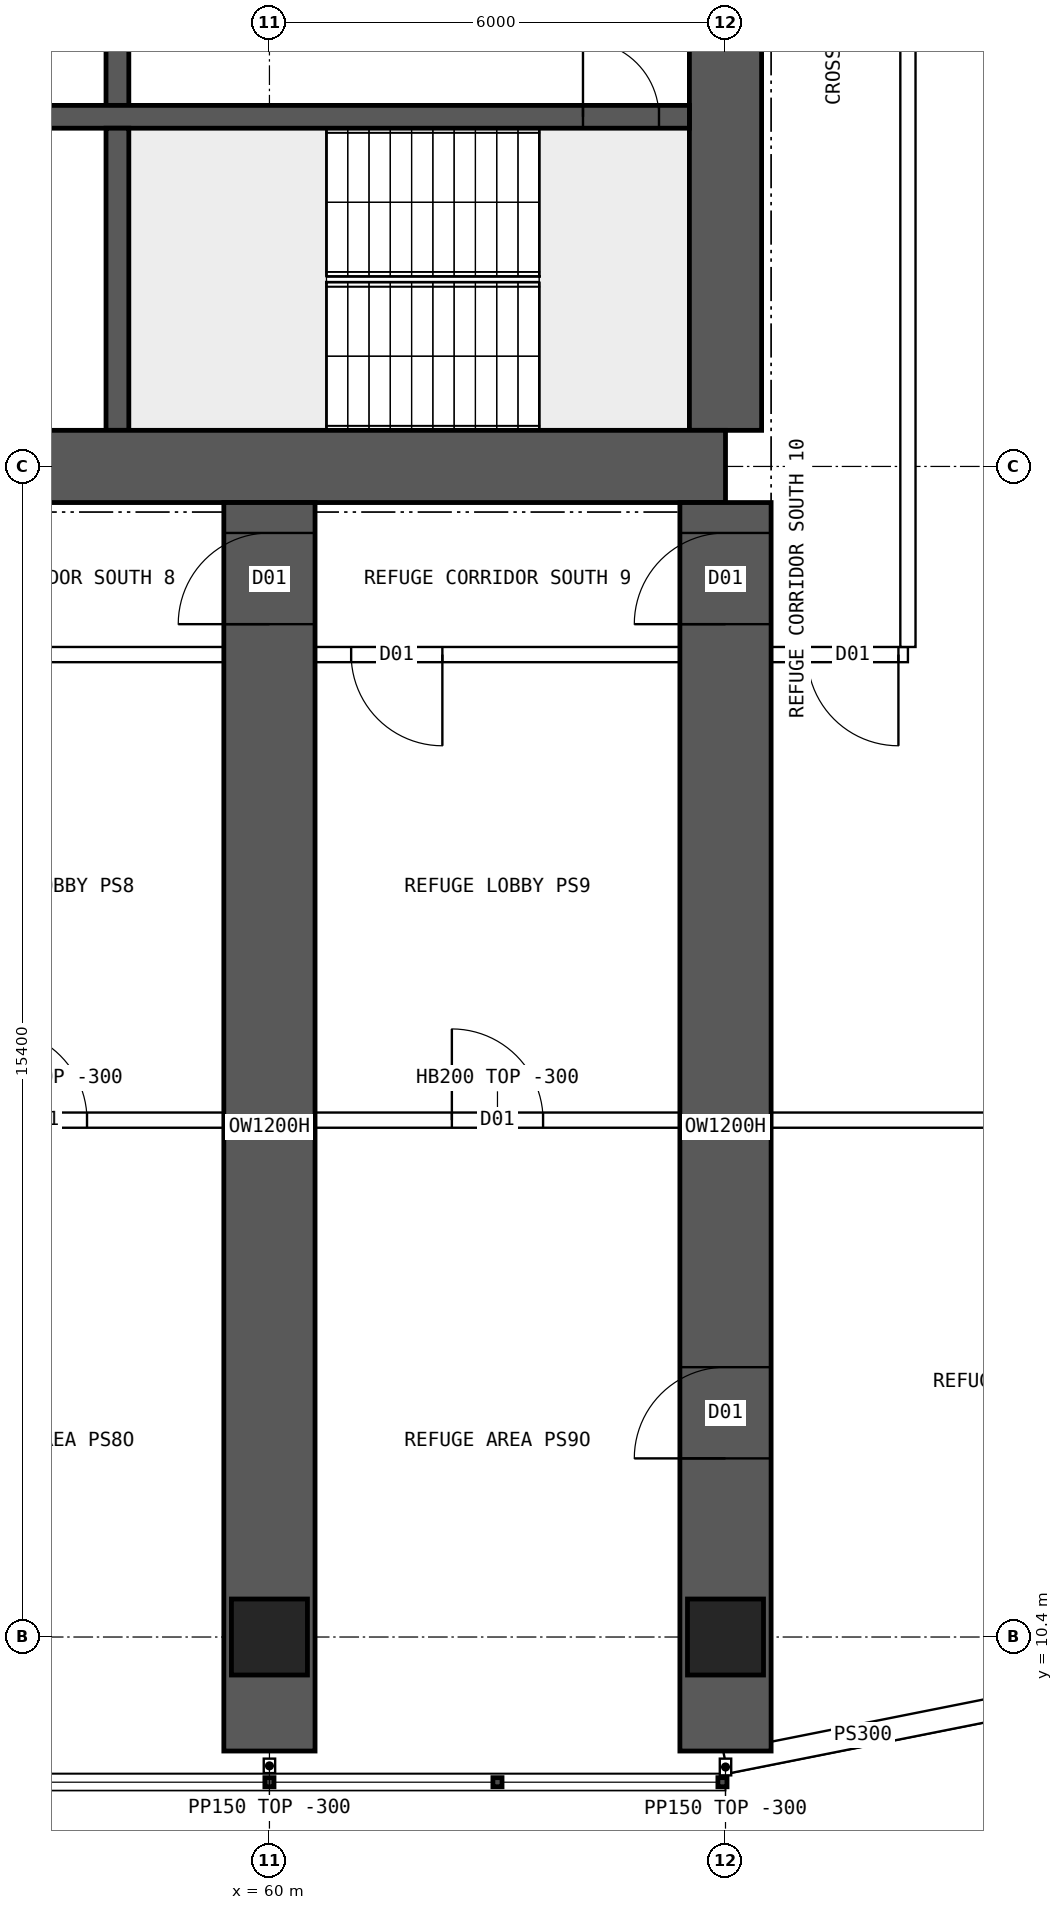
"""IFC4 building model, lengths in metres.
Left out: names, types, materials, properties, quantities, classifications, styles, units other than length and angle.
Written with IfcOpenShell. Run it as: python <this file> out.ifc"""

import sys

from ifc_helpers import new_model, si_unit, direction, frame, frame_2d, origin, origin_2d, place, context, subcontext, project, spatial, polyline, rectangle, hollow_rectangle, outline, extrude, clip, halfspace, element, fill, save


model = new_model("IFC4")
c1 = context("Model", 3, precision=1e-05, world=origin(), true_north=direction((0.0, 1.0)))
c2 = subcontext(c1, "Body", "Model", "MODEL_VIEW")
j1 = project(units=[si_unit("LENGTHUNIT", "METRE"), si_unit("PLANEANGLEUNIT", "RADIAN")], contexts=[c1])
p1 = place(None, origin())
s1 = spatial("IfcSite", under=j1, at=p1, CompositionType="ELEMENT")
p2 = place(p1, origin())
s2 = spatial("IfcBuilding", under=s1, at=p2, CompositionType="ELEMENT")
p3 = place(p2, frame((0.0, 0.0, 133.15)))
s3 = spatial("IfcBuildingStorey", under=s2, at=p3, CompositionType="ELEMENT", Elevation=133.15)
for number, where, z_axis, x_axis in (
    (1, (60.0, 10.4, 0.0), (0.0, 0.0, 1.0), (1.0, 0.0, 0.0)),
    (2, (66.0, 10.4, 0.0), (0.0, 0.0, 1.0), (1.0, 0.0, 0.0)),
):
    element("IfcColumn", number, at=place(p3, frame(where, z_axis=z_axis, x_axis=x_axis)), inside=s3, PredefinedType="COLUMN", context=c2, shape_type="SweptSolid", body=[
        extrude(hollow_rectangle(XDim=1.0, YDim=1.0, WallThickness=0.1, at=origin_2d()), origin(), (0.0, 0.0, 1.0), 7.2),
    ])
p4 = place(p3, frame((18.0, 25.8, 0.0), z_axis=(0.0, 0.0, 1.0), x_axis=(1.0, 0.0, 0.0)))
e3 = element("IfcWall", 3, at=p4, inside=s3, PredefinedType="SHEAR", context=c2, shape_type="SweptSolid", body=[
    extrude(rectangle(XDim=48.0, YDim=0.95, at=frame_2d((24.0, 0.0))), origin(), (0.0, 0.0, 1.0), 7.2),
])
p5 = place(p3, frame((66.0, 26.275, 0.0), z_axis=(0.0, 0.0, 1.0), x_axis=(0.0, 1.0, 0.0)))
e4 = element("IfcWall", 4, at=p5, inside=s3, PredefinedType="SHEAR", context=c2, shape_type="SweptSolid", body=[
    extrude(rectangle(XDim=11.45, YDim=0.95, at=frame_2d((5.725, 0.0))), origin(), (0.0, 0.0, 1.0), 7.2),
])
p6 = place(p5, frame((5.025, 0.0, 0.0)))
e5 = element("IfcOpeningElement", 5, at=p6, cuts=e4, PredefinedType="OPENING", context=c2, shape_type="SweptSolid", body=[
    extrude(rectangle(XDim=1.2, YDim=2.1, at=frame_2d((0.6, 1.05))), frame((0.0, 0.485, 0.0), z_axis=(0.0, -1.0, 0.0), x_axis=(1.0, 0.0, 0.0)), (0.0, 0.0, 1.0), 0.97),
])
p7 = place(p3, frame((18.475, 30.4, 0.0), z_axis=(0.0, 0.0, 1.0), x_axis=(1.0, 0.0, 0.0)))
e6 = element("IfcWall", 6, at=p7, inside=s3, PredefinedType="SHEAR", context=c2, shape_type="SweptSolid", body=[
    extrude(rectangle(XDim=47.05, YDim=0.3, at=frame_2d((23.525, 0.0))), origin(), (0.0, 0.0, 1.0), 7.2),
])
p8 = place(p7, frame((0.4, 0.0, 0.0)))
e7 = element("IfcOpeningElement", 7, at=p8, cuts=e6, PredefinedType="OPENING", context=c2, shape_type="SweptSolid", body=[
    extrude(rectangle(XDim=1.0, YDim=2.1, at=frame_2d((0.5, 1.05))), frame((0.0, 0.16, 0.0), z_axis=(0.0, -1.0, 0.0), x_axis=(1.0, 0.0, 0.0)), (0.0, 0.0, 1.0), 0.32),
])
p9 = place(p7, frame((45.65, 0.0, 0.0)))
e8 = element("IfcOpeningElement", 8, at=p9, cuts=e6, PredefinedType="OPENING", context=c2, shape_type="SweptSolid", body=[
    extrude(rectangle(XDim=1.0, YDim=2.1, at=frame_2d((0.5, 1.05))), frame((0.0, 0.16, 0.0), z_axis=(0.0, -1.0, 0.0), x_axis=(1.0, 0.0, 0.0)), (0.0, 0.0, 1.0), 0.32),
])
p10 = place(p7, frame((18.85, 0.0, 0.0)))
e9 = element("IfcOpeningElement", 9, at=p10, cuts=e6, PredefinedType="OPENING", context=c2, shape_type="SweptSolid", body=[
    extrude(rectangle(XDim=0.9, YDim=2.1, at=frame_2d((0.45, 1.05))), frame((0.0, 0.16, 0.0), z_axis=(0.0, -1.0, 0.0), x_axis=(1.0, 0.0, 0.0)), (0.0, 0.0, 1.0), 0.32),
])
p11 = place(p7, frame((30.142, 0.0, 0.0)))
e10 = element("IfcOpeningElement", 10, at=p11, cuts=e6, PredefinedType="OPENING", context=c2, shape_type="SweptSolid", body=[
    extrude(rectangle(XDim=1.1, YDim=2.1, at=frame_2d((0.55, 1.05))), frame((0.0, 0.16, 0.0), z_axis=(0.0, -1.0, 0.0), x_axis=(1.0, 0.0, 0.0)), (0.0, 0.0, 1.0), 0.32),
])
p12 = place(p7, frame((33.675, 0.0, 0.0)))
e11 = element("IfcOpeningElement", 11, at=p12, cuts=e6, PredefinedType="OPENING", context=c2, shape_type="SweptSolid", body=[
    extrude(rectangle(XDim=1.1, YDim=2.1, at=frame_2d((0.55, 1.05))), frame((0.0, 0.16, 0.0), z_axis=(0.0, -1.0, 0.0), x_axis=(1.0, 0.0, 0.0)), (0.0, 0.0, 1.0), 0.32),
])
p13 = place(p7, frame((37.208, 0.0, 0.0)))
e12 = element("IfcOpeningElement", 12, at=p13, cuts=e6, PredefinedType="OPENING", context=c2, shape_type="SweptSolid", body=[
    extrude(rectangle(XDim=1.1, YDim=2.1, at=frame_2d((0.55, 1.05))), frame((0.0, 0.16, 0.0), z_axis=(0.0, -1.0, 0.0), x_axis=(1.0, 0.0, 0.0)), (0.0, 0.0, 1.0), 0.32),
])
p14 = place(p3, frame((58.0, 26.275, 0.0), z_axis=(0.0, 0.0, 1.0), x_axis=(0.0, 1.0, 0.0)))
e13 = element("IfcWall", 13, at=p14, inside=s3, PredefinedType="SHEAR", context=c2, shape_type="SweptSolid", body=[
    extrude(rectangle(XDim=3.975, YDim=0.3, at=frame_2d((1.988, 0.0))), origin(), (0.0, 0.0, 1.0), 7.2),
])
p15 = place(p3, frame((58.0, 30.55, 0.0), z_axis=(0.0, 0.0, 1.0), x_axis=(0.0, 1.0, 0.0)))
e14 = element("IfcWall", 14, at=p15, inside=s3, PredefinedType="SHEAR", context=c2, shape_type="SweptSolid", body=[
    extrude(rectangle(XDim=3.9, YDim=0.3, at=frame_2d((1.95, 0.0))), origin(), (0.0, 0.0, 1.0), 7.2),
])
p16 = place(p15, frame((1.4, 0.0, 0.0)))
e15 = element("IfcOpeningElement", 15, at=p16, cuts=e14, PredefinedType="OPENING", context=c2, shape_type="SweptSolid", body=[
    extrude(rectangle(XDim=1.2, YDim=2.1, at=frame_2d((0.6, 1.05))), frame((0.0, 0.16, 0.0), z_axis=(0.0, -1.0, 0.0), x_axis=(1.0, 0.0, 0.0)), (0.0, 0.0, 1.0), 0.32),
])
p17 = place(p3, frame((60.0, 8.9, 0.0), z_axis=(0.0, 0.0, 1.0), x_axis=(0.0, 1.0, 0.0)))
e16 = element("IfcWall", 16, at=p17, inside=s3, PredefinedType="SHEAR", context=c2, shape_type="SweptSolid", body=[
    extrude(rectangle(XDim=16.425, YDim=1.2, at=frame_2d((8.212, 0.0))), origin(), (0.0, 0.0, 1.0), 7.2),
])
p18 = place(p17, frame((14.825, 0.0, 0.0)))
e17 = element("IfcOpeningElement", 17, at=p18, cuts=e16, PredefinedType="OPENING", context=c2, shape_type="SweptSolid", body=[
    extrude(rectangle(XDim=1.2, YDim=2.1, at=frame_2d((0.6, 1.05))), frame((0.0, 0.61, 0.0), z_axis=(0.0, -1.0, 0.0), x_axis=(1.0, 0.0, 0.0)), (0.0, 0.0, 1.0), 1.22),
])
p19 = place(p3, frame((66.0, 8.9, 0.0), z_axis=(0.0, 0.0, 1.0), x_axis=(0.0, 1.0, 0.0)))
e18 = element("IfcWall", 18, at=p19, inside=s3, PredefinedType="SHEAR", context=c2, shape_type="SweptSolid", body=[
    extrude(rectangle(XDim=16.425, YDim=1.2, at=frame_2d((8.212, 0.0))), origin(), (0.0, 0.0, 1.0), 7.2),
])
p20 = place(p19, frame((14.825, 0.0, 0.0)))
e19 = element("IfcOpeningElement", 19, at=p20, cuts=e18, PredefinedType="OPENING", context=c2, shape_type="SweptSolid", body=[
    extrude(rectangle(XDim=1.2, YDim=2.1, at=frame_2d((0.6, 1.05))), frame((0.0, 0.61, 0.0), z_axis=(0.0, -1.0, 0.0), x_axis=(1.0, 0.0, 0.0)), (0.0, 0.0, 1.0), 1.22),
])
p21 = place(p19, frame((3.85, 0.0, 0.0)))
e20 = element("IfcOpeningElement", 20, at=p21, cuts=e18, PredefinedType="OPENING", context=c2, shape_type="SweptSolid", body=[
    extrude(rectangle(XDim=1.2, YDim=2.1, at=frame_2d((0.6, 1.05))), frame((0.0, 0.61, 0.0), z_axis=(0.0, -1.0, 0.0), x_axis=(1.0, 0.0, 0.0)), (0.0, 0.0, 1.0), 1.22),
])
p22 = place(p3, frame((66.0, 8.75, 0.0), z_axis=(0.0, 0.0, 1.0), x_axis=(0.980791473772, 0.195059183267, 0.0)))
e21 = element("IfcWall", 21, at=p22, inside=s3, PredefinedType="SOLIDWALL", context=c2, shape_type="SweptSolid", body=[
    extrude(outline(polyline([(-0.03, -0.15), (3.717, -0.15), (3.657, 0.15), (0.03, 0.15), (-0.03, -0.15)])), origin(), (0.0, 0.0, 1.0), 6.9),
])
p23 = place(p3, frame((68.4, 23.325, 0.0), z_axis=(0.0, 0.0, 1.0), x_axis=(-1.0, 0.0, 0.0)))
e22 = element("IfcWall", 22, at=p23, inside=s3, PredefinedType="SOLIDWALL", context=c2, shape_type="SweptSolid", body=[
    extrude(rectangle(XDim=52.8, YDim=0.2, at=frame_2d((26.4, 0.0))), origin(), (0.0, 0.0, 1.0), 6.9),
])
p24 = place(p23, frame((51.0, 0.0, 0.0)))
e23 = element("IfcOpeningElement", 23, at=p24, cuts=e22, PredefinedType="OPENING", context=c2, shape_type="SweptSolid", body=[
    extrude(rectangle(XDim=1.2, YDim=2.1, at=frame_2d((0.6, 1.05))), frame((0.0, 0.11, 0.0), z_axis=(0.0, -1.0, 0.0), x_axis=(1.0, 0.0, 0.0)), (0.0, 0.0, 1.0), 0.22),
])
p25 = place(p23, frame((48.125, 0.0, 0.0)))
e24 = element("IfcOpeningElement", 24, at=p25, cuts=e22, PredefinedType="OPENING", context=c2, shape_type="SweptSolid", body=[
    extrude(rectangle(XDim=1.2, YDim=2.1, at=frame_2d((0.6, 1.05))), frame((0.0, 0.11, 0.0), z_axis=(0.0, -1.0, 0.0), x_axis=(1.0, 0.0, 0.0)), (0.0, 0.0, 1.0), 0.22),
])
p26 = place(p23, frame((42.125, 0.0, 0.0)))
e25 = element("IfcOpeningElement", 25, at=p26, cuts=e22, PredefinedType="OPENING", context=c2, shape_type="SweptSolid", body=[
    extrude(rectangle(XDim=1.2, YDim=2.1, at=frame_2d((0.6, 1.05))), frame((0.0, 0.11, 0.0), z_axis=(0.0, -1.0, 0.0), x_axis=(1.0, 0.0, 0.0)), (0.0, 0.0, 1.0), 0.22),
])
p27 = place(p23, frame((36.125, 0.0, 0.0)))
e26 = element("IfcOpeningElement", 26, at=p27, cuts=e22, PredefinedType="OPENING", context=c2, shape_type="SweptSolid", body=[
    extrude(rectangle(XDim=1.2, YDim=2.1, at=frame_2d((0.6, 1.05))), frame((0.0, 0.11, 0.0), z_axis=(0.0, -1.0, 0.0), x_axis=(1.0, 0.0, 0.0)), (0.0, 0.0, 1.0), 0.22),
])
p28 = place(p23, frame((30.125, 0.0, 0.0)))
e27 = element("IfcOpeningElement", 27, at=p28, cuts=e22, PredefinedType="OPENING", context=c2, shape_type="SweptSolid", body=[
    extrude(rectangle(XDim=1.2, YDim=2.1, at=frame_2d((0.6, 1.05))), frame((0.0, 0.11, 0.0), z_axis=(0.0, -1.0, 0.0), x_axis=(1.0, 0.0, 0.0)), (0.0, 0.0, 1.0), 0.22),
])
p29 = place(p23, frame((24.125, 0.0, 0.0)))
e28 = element("IfcOpeningElement", 28, at=p29, cuts=e22, PredefinedType="OPENING", context=c2, shape_type="SweptSolid", body=[
    extrude(rectangle(XDim=1.2, YDim=2.1, at=frame_2d((0.6, 1.05))), frame((0.0, 0.11, 0.0), z_axis=(0.0, -1.0, 0.0), x_axis=(1.0, 0.0, 0.0)), (0.0, 0.0, 1.0), 0.22),
])
p30 = place(p23, frame((18.125, 0.0, 0.0)))
e29 = element("IfcOpeningElement", 29, at=p30, cuts=e22, PredefinedType="OPENING", context=c2, shape_type="SweptSolid", body=[
    extrude(rectangle(XDim=1.2, YDim=2.1, at=frame_2d((0.6, 1.05))), frame((0.0, 0.11, 0.0), z_axis=(0.0, -1.0, 0.0), x_axis=(1.0, 0.0, 0.0)), (0.0, 0.0, 1.0), 0.22),
])
p31 = place(p23, frame((12.125, 0.0, 0.0)))
e30 = element("IfcOpeningElement", 30, at=p31, cuts=e22, PredefinedType="OPENING", context=c2, shape_type="SweptSolid", body=[
    extrude(rectangle(XDim=1.2, YDim=2.1, at=frame_2d((0.6, 1.05))), frame((0.0, 0.11, 0.0), z_axis=(0.0, -1.0, 0.0), x_axis=(1.0, 0.0, 0.0)), (0.0, 0.0, 1.0), 0.22),
])
p32 = place(p23, frame((6.125, 0.0, 0.0)))
e31 = element("IfcOpeningElement", 31, at=p32, cuts=e22, PredefinedType="OPENING", context=c2, shape_type="SweptSolid", body=[
    extrude(rectangle(XDim=1.2, YDim=2.1, at=frame_2d((0.6, 1.05))), frame((0.0, 0.11, 0.0), z_axis=(0.0, -1.0, 0.0), x_axis=(1.0, 0.0, 0.0)), (0.0, 0.0, 1.0), 0.22),
])
p33 = place(p23, frame((0.125, 0.0, 0.0)))
e32 = element("IfcOpeningElement", 32, at=p33, cuts=e22, PredefinedType="OPENING", context=c2, shape_type="SweptSolid", body=[
    extrude(rectangle(XDim=1.2, YDim=2.1, at=frame_2d((0.6, 1.05))), frame((0.0, 0.11, 0.0), z_axis=(0.0, -1.0, 0.0), x_axis=(1.0, 0.0, 0.0)), (0.0, 0.0, 1.0), 0.22),
])
p34 = place(p3, frame((68.4, 23.425, 0.0), z_axis=(0.0, 0.0, 1.0), x_axis=(0.0, 1.0, 0.0)))
e33 = element("IfcWall", 33, at=p34, inside=s3, PredefinedType="SOLIDWALL", context=c2, shape_type="SweptSolid", body=[
    extrude(rectangle(XDim=17.15, YDim=0.2, at=frame_2d((8.575, 0.0))), origin(), (0.0, 0.0, 1.0), 6.9),
])
p35 = place(p3, frame((54.475, 17.2, 0.0), z_axis=(0.0, 0.0, 1.0), x_axis=(1.0, 0.0, 0.0)))
e34 = element("IfcWall", 34, at=p35, inside=s3, PredefinedType="SOLIDWALL", context=c2, shape_type="SweptSolid", body=[
    extrude(rectangle(XDim=5.05, YDim=0.2, at=frame_2d((2.525, 0.0))), origin(), (0.0, 0.0, 1.0), 6.9),
])
p36 = place(p35, frame((1.925, 0.0, 0.0)))
e35 = element("IfcOpeningElement", 35, at=p36, cuts=e34, PredefinedType="OPENING", context=c2, shape_type="SweptSolid", body=[
    extrude(rectangle(XDim=1.2, YDim=2.1, at=frame_2d((0.6, 1.05))), frame((0.0, 0.11, 0.0), z_axis=(0.0, -1.0, 0.0), x_axis=(1.0, 0.0, 0.0)), (0.0, 0.0, 1.0), 0.22),
])
p37 = place(p3, frame((60.475, 17.2, 0.0), z_axis=(0.0, 0.0, 1.0), x_axis=(1.0, 0.0, 0.0)))
e36 = element("IfcWall", 36, at=p37, inside=s3, PredefinedType="SOLIDWALL", context=c2, shape_type="SweptSolid", body=[
    extrude(rectangle(XDim=5.05, YDim=0.2, at=frame_2d((2.525, 0.0))), origin(), (0.0, 0.0, 1.0), 6.9),
])
p38 = place(p37, frame((1.925, 0.0, 0.0)))
e37 = element("IfcOpeningElement", 37, at=p38, cuts=e36, PredefinedType="OPENING", context=c2, shape_type="SweptSolid", body=[
    extrude(rectangle(XDim=1.2, YDim=2.1, at=frame_2d((0.6, 1.05))), frame((0.0, 0.11, 0.0), z_axis=(0.0, -1.0, 0.0), x_axis=(1.0, 0.0, 0.0)), (0.0, 0.0, 1.0), 0.22),
])
p39 = place(p3, frame((66.475, 17.2, 0.0), z_axis=(0.0, 0.0, 1.0), x_axis=(1.0, 0.0, 0.0)))
e38 = element("IfcWall", 38, at=p39, inside=s3, PredefinedType="SOLIDWALL", context=c2, shape_type="Clipping", body=[
    clip(clip(extrude(outline(polyline([(-0.03, 0.0), (8.648, 0.0), (8.648, 6.9), (5.827, 6.9), (5.825, 6.45), (5.227, 6.45), (5.225, 6.9), (-0.03, 6.9), (-0.03, 0.0)])), frame((0.0, 0.1, 0.0), z_axis=(0.0, -1.0, 0.0), x_axis=(1.0, 0.0, 0.0)), (0.0, 0.0, 1.0), 0.2), halfspace(frame((0.0, 0.0, 0.0), z_axis=(-1.0, 0.0, 0.0)), False)), halfspace(frame((8.618, 0.0, 0.0), z_axis=(0.98078778892, -0.195077710428, 0.0)), False)),
])
p40 = place(p39, frame((3.708, 0.0, 0.0)))
e39 = element("IfcOpeningElement", 39, at=p40, cuts=e38, PredefinedType="OPENING", context=c2, shape_type="SweptSolid", body=[
    extrude(rectangle(XDim=1.2, YDim=2.1, at=frame_2d((0.6, 1.05))), frame((0.0, 0.11, 0.0), z_axis=(0.0, -1.0, 0.0), x_axis=(1.0, 0.0, 0.0)), (0.0, 0.0, 1.0), 0.22),
])
p41 = place(p3, frame((60.0, 8.8, 0.0), z_axis=(0.0, 0.0, 1.0), x_axis=(0.0, -1.0, 0.0)))
e40 = element("IfcWall", 40, at=p41, inside=s3, PredefinedType="PARTITIONING", context=c2, shape_type="SweptSolid", body=[
    extrude(rectangle(XDim=0.19, YDim=0.15, at=frame_2d((0.095, 0.0))), origin(), (0.0, 0.0, 1.0), 6.9),
])
p42 = place(p3, frame((66.0, 8.8, 0.0), z_axis=(0.0, 0.0, 1.0), x_axis=(0.0, -1.0, 0.0)))
e41 = element("IfcWall", 41, at=p42, inside=s3, PredefinedType="PARTITIONING", context=c2, shape_type="SweptSolid", body=[
    extrude(rectangle(XDim=0.22, YDim=0.15, at=frame_2d((0.11, 0.0))), origin(), (0.0, 0.0, 1.0), 6.9),
])
p43 = place(p9, origin())
e42 = element("IfcDoor", 42, at=p43, inside=s3, OperationType="SINGLE_SWING_LEFT", PredefinedType="DOOR", context=c2, shape_type="SweptSolid", body=[
    extrude(rectangle(XDim=1.0, YDim=2.1, at=frame_2d((0.5, 1.05))), frame((0.0, 0.025, 0.0), z_axis=(0.0, -1.0, 0.0), x_axis=(1.0, 0.0, 0.0)), (0.0, 0.0, 1.0), 0.05),
])
fill(e8, e42)
p44 = place(p36, origin())
e43 = element("IfcDoor", 43, at=p44, inside=s3, OperationType="SINGLE_SWING_LEFT", PredefinedType="DOOR", context=c2, shape_type="SweptSolid", body=[
    extrude(rectangle(XDim=1.2, YDim=2.1, at=frame_2d((0.6, 1.05))), frame((0.0, 0.025, 0.0), z_axis=(0.0, -1.0, 0.0), x_axis=(1.0, 0.0, 0.0)), (0.0, 0.0, 1.0), 0.05),
])
fill(e35, e43)
p45 = place(p38, origin())
e44 = element("IfcDoor", 44, at=p45, inside=s3, OperationType="SINGLE_SWING_LEFT", PredefinedType="DOOR", context=c2, shape_type="SweptSolid", body=[
    extrude(rectangle(XDim=1.2, YDim=2.1, at=frame_2d((0.6, 1.05))), frame((0.0, 0.025, 0.0), z_axis=(0.0, -1.0, 0.0), x_axis=(1.0, 0.0, 0.0)), (0.0, 0.0, 1.0), 0.05),
])
fill(e37, e44)
p46 = place(p32, origin())
e45 = element("IfcDoor", 45, at=p46, inside=s3, OperationType="SINGLE_SWING_LEFT", PredefinedType="DOOR", context=c2, shape_type="SweptSolid", body=[
    extrude(rectangle(XDim=1.2, YDim=2.1, at=frame_2d((0.6, 1.05))), frame((0.0, 0.025, 0.0), z_axis=(0.0, -1.0, 0.0), x_axis=(1.0, 0.0, 0.0)), (0.0, 0.0, 1.0), 0.05),
])
fill(e31, e45)
p47 = place(p33, origin())
e46 = element("IfcDoor", 46, at=p47, inside=s3, OperationType="SINGLE_SWING_LEFT", PredefinedType="DOOR", context=c2, shape_type="SweptSolid", body=[
    extrude(rectangle(XDim=1.2, YDim=2.1, at=frame_2d((0.6, 1.05))), frame((0.0, 0.025, 0.0), z_axis=(0.0, -1.0, 0.0), x_axis=(1.0, 0.0, 0.0)), (0.0, 0.0, 1.0), 0.05),
])
fill(e32, e46)
p48 = place(p18, origin())
e47 = element("IfcDoor", 47, at=p48, inside=s3, OperationType="SINGLE_SWING_LEFT", PredefinedType="DOOR", context=c2, shape_type="SweptSolid", body=[
    extrude(rectangle(XDim=1.2, YDim=2.1, at=frame_2d((0.6, 1.05))), frame((0.0, 0.025, 0.0), z_axis=(0.0, -1.0, 0.0), x_axis=(1.0, 0.0, 0.0)), (0.0, 0.0, 1.0), 0.05),
])
fill(e17, e47)
p49 = place(p20, origin())
e48 = element("IfcDoor", 48, at=p49, inside=s3, OperationType="SINGLE_SWING_LEFT", PredefinedType="DOOR", context=c2, shape_type="SweptSolid", body=[
    extrude(rectangle(XDim=1.2, YDim=2.1, at=frame_2d((0.6, 1.05))), frame((0.0, 0.025, 0.0), z_axis=(0.0, -1.0, 0.0), x_axis=(1.0, 0.0, 0.0)), (0.0, 0.0, 1.0), 0.05),
])
fill(e19, e48)
p50 = place(p21, origin())
e49 = element("IfcDoor", 49, at=p50, inside=s3, OperationType="SINGLE_SWING_LEFT", PredefinedType="DOOR", context=c2, shape_type="SweptSolid", body=[
    extrude(rectangle(XDim=1.2, YDim=2.1, at=frame_2d((0.6, 1.05))), frame((0.0, -0.535, 0.0), z_axis=(0.0, -1.0, 0.0), x_axis=(1.0, 0.0, 0.0)), (0.0, 0.0, 1.0), 0.05),
])
fill(e20, e49)
save(model, sys.argv[1])
